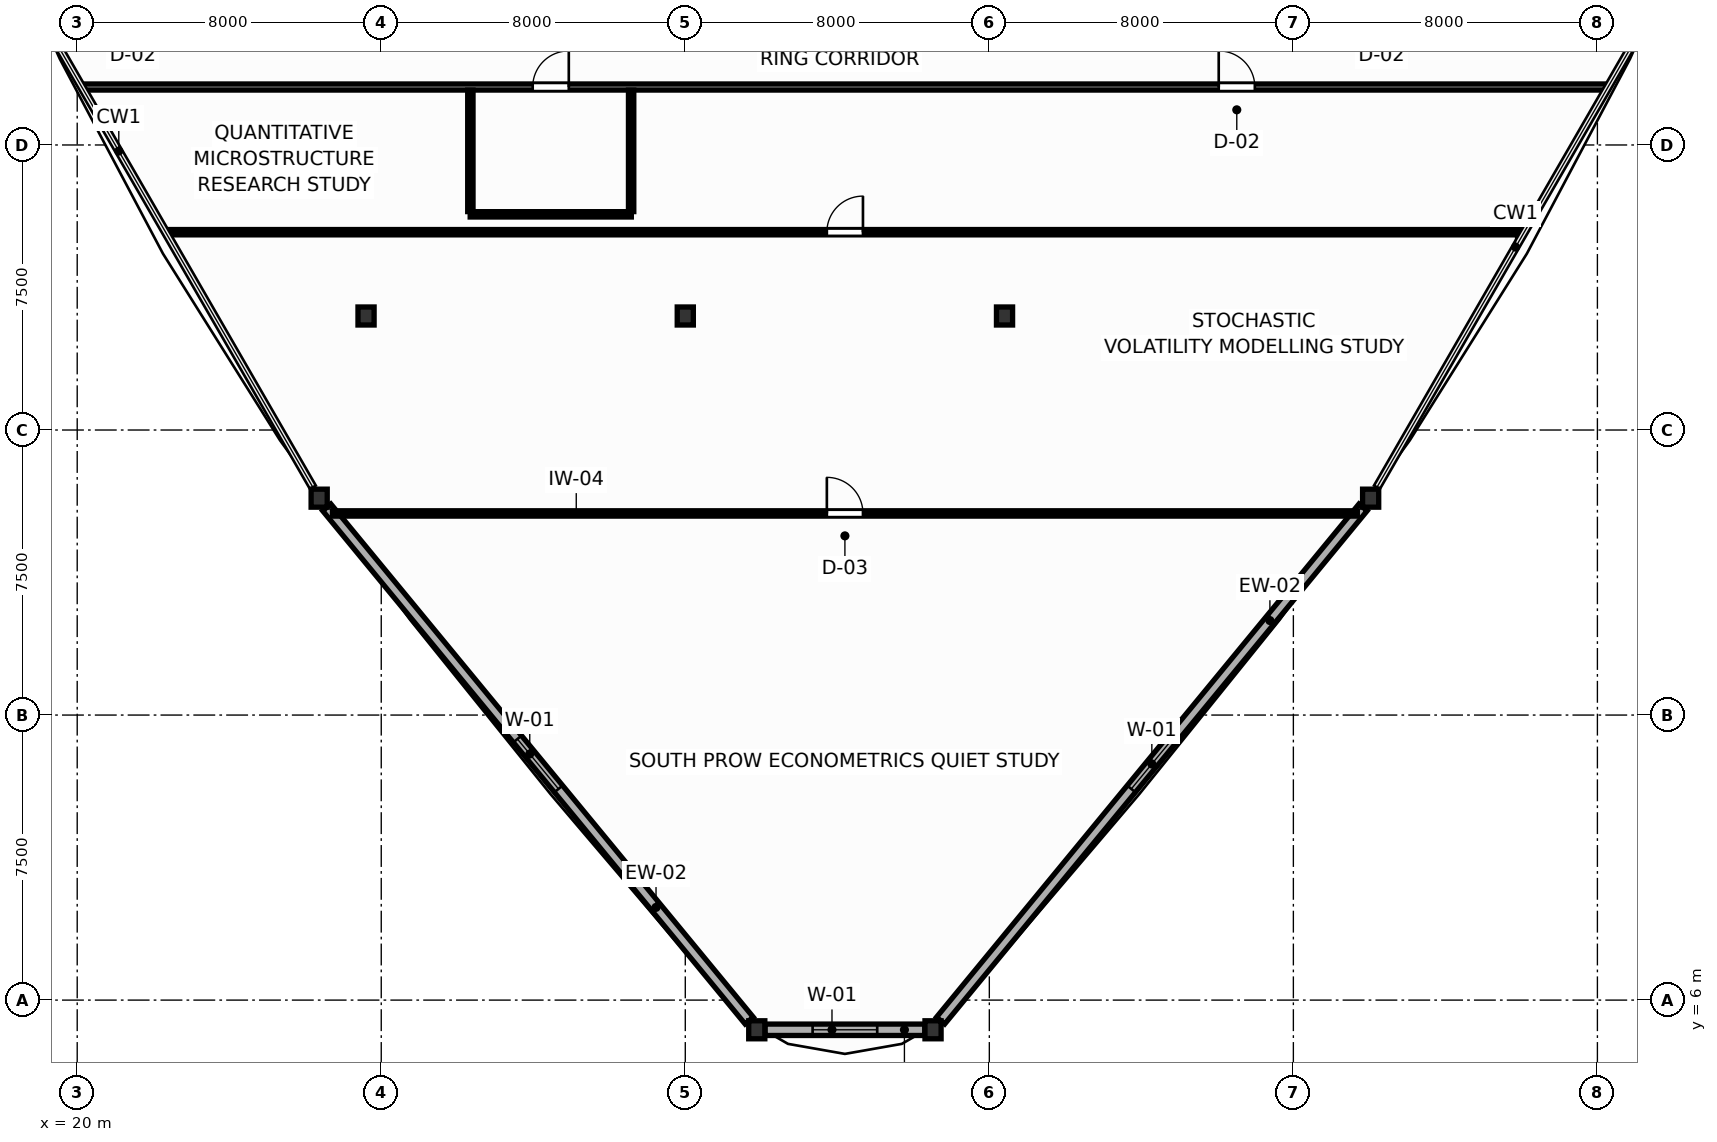
"""IFC4 building model, lengths in metres.
Left out: names, types, materials, properties, quantities, classifications, styles, units other than length and angle.
Written with IfcOpenShell. Run it as: python <this file> out.ifc"""

import sys

from ifc_helpers import new_model, si_unit, direction, frame, frame_2d, origin, origin_2d, place, context, subcontext, project, spatial, rectangle, i_section, extrude, source, transform, mapped, element, fill, save


model = new_model("IFC4")
c1 = context("Model", 3, precision=1e-05, world=origin(), true_north=direction((0.0, 1.0)))
c2 = subcontext(c1, "Body", "Model", "MODEL_VIEW")
j1 = project(units=[si_unit("LENGTHUNIT", "METRE"), si_unit("PLANEANGLEUNIT", "RADIAN")], contexts=[c1])
p1 = place(None, origin())
s1 = spatial("IfcSite", under=j1, at=p1, CompositionType="ELEMENT")
p2 = place(p1, origin())
s2 = spatial("IfcBuilding", under=s1, at=p2, CompositionType="ELEMENT")
p3 = place(p2, frame((0.0, 0.0, 67.8)))
s3 = spatial("IfcBuildingStorey", under=s2, at=p3, CompositionType="ELEMENT", Elevation=67.8)
m1 = source(origin(), c2, "Body", "SweptSolid", [
    extrude(i_section(OverallWidth=0.424, OverallDepth=0.474, WebThickness=0.045, FlangeThickness=0.072, FilletRadius=0.015, at=origin_2d()), origin(), (0.0, 0.0, 1.0), 3.9),
])
for number, where, z_axis, x_axis in (
    (1, (27.6, 24.0, 0.0), (0.0, 0.0, 1.0), (1.0, 0.0, 0.0)),
    (2, (44.4, 24.0, 0.0), (0.0, 0.0, 1.0), (1.0, 0.0, 0.0)),
    (3, (36.0, 24.0, 0.0), (0.0, 0.0, 1.0), (1.0, 0.0, 0.0)),
    (4, (26.367, 19.207, 0.0), (0.0, 0.0, 1.0), (1.0, 0.0, 0.0)),
    (5, (37.881, 5.219, 0.0), (0.0, 0.0, 1.0), (1.0, 0.0, 0.0)),
    (6, (42.519, 5.219, 0.0), (0.0, 0.0, 1.0), (1.0, 0.0, 0.0)),
    (7, (54.033, 19.207, 0.0), (0.0, 0.0, 1.0), (1.0, 0.0, 0.0)),
):
    element("IfcColumn", number, at=place(p3, frame(where, z_axis=z_axis, x_axis=x_axis)), inside=s3, PredefinedType="COLUMN", context=c2, shape_type="MappedRepresentation", body=[
        mapped(m1, transform((0.0, 0.0, 0.0), scale=1.0)),
    ])
p4 = place(p3, frame((26.566, 18.965, 0.0), z_axis=(0.0, 0.0, 1.0), x_axis=(0.635547248194, -0.772061976342, 0.0)))
e8 = element("IfcWall", 8, at=p4, inside=s3, PredefinedType="SOLIDWALL", context=c2, shape_type="SweptSolid", body=[
    extrude(rectangle(XDim=17.49, YDim=0.28, at=frame_2d((8.745, 0.0))), origin(), (0.0, 0.0, 1.0), 3.23),
])
p5 = place(p4, frame((7.895, 0.0, 0.75)))
e9 = element("IfcOpeningElement", 9, at=p5, cuts=e8, PredefinedType="OPENING", context=c2, shape_type="SweptSolid", body=[
    extrude(rectangle(XDim=1.7, YDim=1.75, at=frame_2d((0.85, 0.875))), frame((0.0, 0.15, 0.0), z_axis=(0.0, -1.0, 0.0), x_axis=(1.0, 0.0, 0.0)), (0.0, 0.0, 1.0), 0.3),
])
p6 = place(p3, frame((38.098, 5.219, 0.0), z_axis=(0.0, 0.0, 1.0), x_axis=(1.0, 0.0, 0.0)))
e10 = element("IfcWall", 10, at=p6, inside=s3, PredefinedType="SOLIDWALL", context=c2, shape_type="SweptSolid", body=[
    extrude(rectangle(XDim=4.204, YDim=0.3, at=frame_2d((2.102, 0.0))), origin(), (0.0, 0.0, 1.0), 3.23),
])
p7 = place(p6, frame((1.252, 0.0, 0.75)))
e11 = element("IfcOpeningElement", 11, at=p7, cuts=e10, PredefinedType="OPENING", context=c2, shape_type="SweptSolid", body=[
    extrude(rectangle(XDim=1.7, YDim=1.75, at=frame_2d((0.85, 0.875))), frame((0.0, 0.16, 0.0), z_axis=(0.0, -1.0, 0.0), x_axis=(1.0, 0.0, 0.0)), (0.0, 0.0, 1.0), 0.32),
])
p8 = place(p3, frame((42.718, 5.461, 0.0), z_axis=(0.0, 0.0, 1.0), x_axis=(0.635547248194, 0.772061976342, 0.0)))
e12 = element("IfcWall", 12, at=p8, inside=s3, PredefinedType="SOLIDWALL", context=c2, shape_type="SweptSolid", body=[
    extrude(rectangle(XDim=17.49, YDim=0.28, at=frame_2d((8.745, 0.0))), origin(), (0.0, 0.0, 1.0), 3.23),
])
p9 = place(p8, frame((7.895, 0.0, 0.75)))
e13 = element("IfcOpeningElement", 13, at=p9, cuts=e12, PredefinedType="OPENING", context=c2, shape_type="SweptSolid", body=[
    extrude(rectangle(XDim=1.7, YDim=1.75, at=frame_2d((0.85, 0.875))), frame((0.0, 0.15, 0.0), z_axis=(0.0, -1.0, 0.0), x_axis=(1.0, 0.0, 0.0)), (0.0, 0.0, 1.0), 0.3),
])
p10 = place(p3, frame((20.141, 30.025, 0.0), z_axis=(0.0, 0.0, 1.0), x_axis=(1.0, 0.0, 0.0)))
e14 = element("IfcWall", 14, at=p10, inside=s3, PredefinedType="PARTITIONING", context=c2, shape_type="SweptSolid", body=[
    extrude(rectangle(XDim=40.119, YDim=0.16, at=frame_2d((20.06, 0.0))), origin(), (0.0, 0.0, 1.0), 3.68),
])
p11 = place(p10, frame((11.844, 0.0, 0.0)))
e15 = element("IfcOpeningElement", 15, at=p11, cuts=e14, PredefinedType="OPENING", context=c2, shape_type="SweptSolid", body=[
    extrude(rectangle(XDim=0.95, YDim=2.05, at=frame_2d((0.475, 1.025))), frame((0.0, 0.09, 0.0), z_axis=(0.0, -1.0, 0.0), x_axis=(1.0, 0.0, 0.0)), (0.0, 0.0, 1.0), 0.18),
])
p12 = place(p10, frame((29.896, 0.0, 0.0)))
e16 = element("IfcOpeningElement", 16, at=p12, cuts=e14, PredefinedType="OPENING", context=c2, shape_type="SweptSolid", body=[
    extrude(rectangle(XDim=0.95, YDim=2.05, at=frame_2d((0.475, 1.025))), frame((0.0, 0.09, 0.0), z_axis=(0.0, -1.0, 0.0), x_axis=(1.0, 0.0, 0.0)), (0.0, 0.0, 1.0), 0.18),
])
p13 = place(p3, frame((22.346, 26.205, 0.0), z_axis=(0.0, 0.0, 1.0), x_axis=(1.0, 0.0, 0.0)))
e17 = element("IfcWall", 17, at=p13, inside=s3, PredefinedType="PARTITIONING", context=c2, shape_type="SweptSolid", body=[
    extrude(rectangle(XDim=35.708, YDim=0.14, at=frame_2d((17.854, 0.0))), origin(), (0.0, 0.0, 1.0), 3.68),
])
p14 = place(p13, frame((17.379, 0.0, 0.0)))
e18 = element("IfcOpeningElement", 18, at=p14, cuts=e17, PredefinedType="OPENING", context=c2, shape_type="SweptSolid", body=[
    extrude(rectangle(XDim=0.95, YDim=2.05, at=frame_2d((0.475, 1.025))), frame((0.0, 0.08, 0.0), z_axis=(0.0, -1.0, 0.0), x_axis=(1.0, 0.0, 0.0)), (0.0, 0.0, 1.0), 0.16),
])
p15 = place(p3, frame((26.717, 18.805, 0.0), z_axis=(0.0, 0.0, 1.0), x_axis=(1.0, 0.0, 0.0)))
e19 = element("IfcWall", 19, at=p15, inside=s3, PredefinedType="PARTITIONING", context=c2, shape_type="SweptSolid", body=[
    extrude(rectangle(XDim=26.965, YDim=0.14, at=frame_2d((13.483, 0.0))), origin(), (0.0, 0.0, 1.0), 3.68),
])
p16 = place(p15, frame((13.008, 0.0, 0.0)))
e20 = element("IfcOpeningElement", 20, at=p16, cuts=e19, PredefinedType="OPENING", context=c2, shape_type="SweptSolid", body=[
    extrude(rectangle(XDim=0.95, YDim=2.05, at=frame_2d((0.475, 1.025))), frame((0.0, 0.08, 0.0), z_axis=(0.0, -1.0, 0.0), x_axis=(1.0, 0.0, 0.0)), (0.0, 0.0, 1.0), 0.16),
])
p17 = place(p3, frame((30.34, 26.675, 0.0), z_axis=(0.0, 0.0, 1.0), x_axis=(1.0, 0.0, 0.0)))
e21 = element("IfcWall", 21, at=p17, inside=s3, PredefinedType="PARTITIONING", context=c2, shape_type="SweptSolid", body=[
    extrude(rectangle(XDim=4.24, YDim=0.14, at=frame_2d((2.12, 0.0))), origin(), (0.0, 0.0, 1.0), 3.68),
])
for number, where, z_axis, x_axis in (
    (22, (34.575, 26.747, 0.0), (0.0, 0.0, 1.0), (0.0, 1.0, 0.0)),
    (23, (30.345, 26.747, 0.0), (0.0, 0.0, 1.0), (0.0, 1.0, 0.0)),
):
    element("IfcWall", number, at=place(p3, frame(where, z_axis=z_axis, x_axis=x_axis)), inside=s3, PredefinedType="PARTITIONING", context=c2, shape_type="SweptSolid", body=[
        extrude(rectangle(XDim=3.196, YDim=0.14, at=frame_2d((1.598, 0.0))), origin(), (0.0, 0.0, 1.0), 3.68),
    ])
p18 = place(p5, origin())
e24 = element("IfcWindow", 24, at=p18, inside=s3, PartitioningType="SINGLE_PANEL", PredefinedType="WINDOW", context=c2, shape_type="SweptSolid", body=[
    extrude(rectangle(XDim=1.7, YDim=1.75, at=frame_2d((0.85, 0.875))), frame((0.0, 0.03, 0.0), z_axis=(0.0, -1.0, 0.0), x_axis=(1.0, 0.0, 0.0)), (0.0, 0.0, 1.0), 0.06),
])
fill(e9, e24)
p19 = place(p7, origin())
e25 = element("IfcWindow", 25, at=p19, inside=s3, PartitioningType="SINGLE_PANEL", PredefinedType="WINDOW", context=c2, shape_type="SweptSolid", body=[
    extrude(rectangle(XDim=1.7, YDim=1.75, at=frame_2d((0.85, 0.875))), frame((0.0, 0.03, 0.0), z_axis=(0.0, -1.0, 0.0), x_axis=(1.0, 0.0, 0.0)), (0.0, 0.0, 1.0), 0.06),
])
fill(e11, e25)
p20 = place(p9, origin())
e26 = element("IfcWindow", 26, at=p20, inside=s3, PartitioningType="SINGLE_PANEL", PredefinedType="WINDOW", context=c2, shape_type="SweptSolid", body=[
    extrude(rectangle(XDim=1.7, YDim=1.75, at=frame_2d((0.85, 0.875))), frame((0.0, 0.03, 0.0), z_axis=(0.0, -1.0, 0.0), x_axis=(1.0, 0.0, 0.0)), (0.0, 0.0, 1.0), 0.06),
])
fill(e13, e26)
p21 = place(p11, origin())
e27 = element("IfcDoor", 27, at=p21, inside=s3, OperationType="SINGLE_SWING_RIGHT", PredefinedType="DOOR", context=c2, shape_type="SweptSolid", body=[
    extrude(rectangle(XDim=0.95, YDim=2.05, at=frame_2d((0.475, 1.025))), frame((0.0, 0.025, 0.0), z_axis=(0.0, -1.0, 0.0), x_axis=(1.0, 0.0, 0.0)), (0.0, 0.0, 1.0), 0.05),
])
fill(e15, e27)
p22 = place(p12, origin())
e28 = element("IfcDoor", 28, at=p22, inside=s3, OperationType="SINGLE_SWING_LEFT", PredefinedType="DOOR", context=c2, shape_type="SweptSolid", body=[
    extrude(rectangle(XDim=0.95, YDim=2.05, at=frame_2d((0.475, 1.025))), frame((0.0, 0.025, 0.0), z_axis=(0.0, -1.0, 0.0), x_axis=(1.0, 0.0, 0.0)), (0.0, 0.0, 1.0), 0.05),
])
fill(e16, e28)
p23 = place(p14, origin())
e29 = element("IfcDoor", 29, at=p23, inside=s3, OperationType="SINGLE_SWING_RIGHT", PredefinedType="DOOR", context=c2, shape_type="SweptSolid", body=[
    extrude(rectangle(XDim=0.95, YDim=2.05, at=frame_2d((0.475, 1.025))), frame((0.0, 0.025, 0.0), z_axis=(0.0, -1.0, 0.0), x_axis=(1.0, 0.0, 0.0)), (0.0, 0.0, 1.0), 0.05),
])
fill(e18, e29)
p24 = place(p16, origin())
e30 = element("IfcDoor", 30, at=p24, inside=s3, OperationType="SINGLE_SWING_LEFT", PredefinedType="DOOR", context=c2, shape_type="SweptSolid", body=[
    extrude(rectangle(XDim=0.95, YDim=2.05, at=frame_2d((0.475, 1.025))), frame((0.0, 0.025, 0.0), z_axis=(0.0, -1.0, 0.0), x_axis=(1.0, 0.0, 0.0)), (0.0, 0.0, 1.0), 0.05),
])
fill(e20, e30)
save(model, sys.argv[1])
